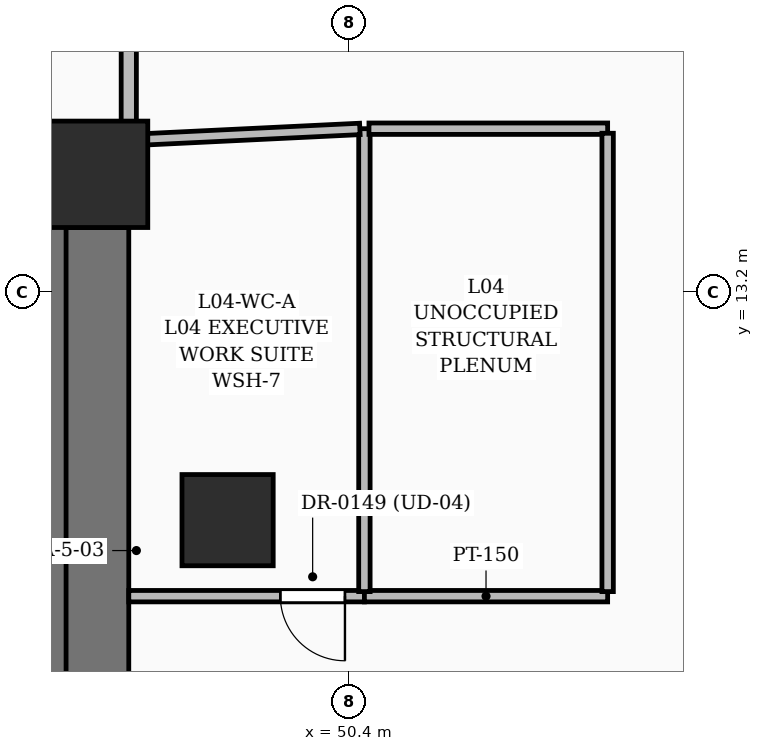
"""IFC4 building model, lengths in metres.
Left out: names, types, materials, properties, quantities, classifications, styles, units other than length and angle.
Written with IfcOpenShell. Run it as: python <this file> out.ifc"""

import sys

from ifc_helpers import new_model, si_unit, direction, frame, frame_2d, origin, origin_2d, place, context, subcontext, project, spatial, rectangle, extrude, element, fill, save


model = new_model("IFC4")
c1 = context("Model", 3, precision=1e-05, world=origin(), true_north=direction((0.0, 1.0)))
c2 = subcontext(c1, "Body", "Model", "MODEL_VIEW")
j1 = project(units=[si_unit("LENGTHUNIT", "METRE"), si_unit("PLANEANGLEUNIT", "RADIAN")], contexts=[c1])
p1 = place(None, origin())
s1 = spatial("IfcSite", under=j1, at=p1, CompositionType="ELEMENT")
p2 = place(p1, origin())
s2 = spatial("IfcBuilding", under=s1, at=p2, CompositionType="ELEMENT")
p3 = place(p2, frame((0.0, 0.0, 21.9)))
s3 = spatial("IfcBuildingStorey", under=s2, at=p3, CompositionType="ELEMENT", Elevation=21.9)
p4 = place(p3, frame((47.05, 14.75, 0.0), z_axis=(0.0, 0.0, 1.0), x_axis=(1.0, 0.0, 0.0)))
e1 = element("IfcColumn", 1, at=p4, inside=s3, PredefinedType="COLUMN", context=c2, shape_type="SweptSolid", body=[
    extrude(rectangle(XDim=1.4, YDim=1.4, at=origin_2d()), origin(), (0.0, 0.0, 1.0), 4.5),
])
p5 = place(p3, frame((48.8, 10.2, 0.0), z_axis=(0.0, 0.0, 1.0), x_axis=(1.0, 0.0, 0.0)))
e2 = element("IfcColumn", 2, at=p5, inside=s3, PredefinedType="COLUMN", context=c2, shape_type="SweptSolid", body=[
    extrude(rectangle(XDim=1.2, YDim=1.2, at=origin_2d()), origin(), (0.0, 0.0, 1.0), 4.5),
])
p6 = place(p3, frame((47.05, 5.25, 0.0), z_axis=(0.0, 0.0, 1.0), x_axis=(0.0, 1.0, 0.0)))
e3 = element("IfcWall", 3, at=p6, inside=s3, PredefinedType="SHEAR", context=c2, shape_type="SweptSolid", body=[
    extrude(rectangle(XDim=8.8, YDim=0.9, at=frame_2d((4.4, 0.0))), origin(), (0.0, 0.0, 1.0), 4.5),
])
p7 = place(p3, frame((46.5, 5.2, 0.0), z_axis=(0.0, 0.0, 1.0), x_axis=(0.0, 1.0, 0.0)))
e4 = element("IfcWall", 4, at=p7, inside=s3, PredefinedType="SOLIDWALL", context=c2, shape_type="SweptSolid", body=[
    extrude(rectangle(XDim=9.1, YDim=0.35, at=frame_2d((4.55, 0.0))), origin(), (0.0, 0.0, 1.0), 4.5),
])
p8 = place(p3, frame((47.5, 15.2, 0.0), z_axis=(0.0, 0.0, 1.0), x_axis=(0.0, 1.0, 0.0)))
e5 = element("IfcWall", 5, at=p8, inside=s3, PredefinedType="PARTITIONING", context=c2, shape_type="SweptSolid", body=[
    extrude(rectangle(XDim=2.6, YDim=0.2, at=frame_2d((1.3, 0.0))), origin(), (0.0, 0.0, 1.0), 1.97),
])
p9 = place(p3, frame((50.6, 9.2, 0.0), z_axis=(0.0, 0.0, 1.0), x_axis=(-1.0, 0.0, 0.0)))
e6 = element("IfcWall", 6, at=p9, inside=s3, PredefinedType="PARTITIONING", context=c2, shape_type="SweptSolid", body=[
    extrude(rectangle(XDim=3.1, YDim=0.15, at=frame_2d((1.55, 0.0))), origin(), (0.0, 0.0, 1.0), 3.159),
])
p10 = place(p9, frame((0.256, 0.0, 0.0)))
e7 = element("IfcOpeningElement", 7, at=p10, cuts=e6, PredefinedType="OPENING", context=c2, shape_type="SweptSolid", body=[
    extrude(rectangle(XDim=0.85, YDim=2.1, at=frame_2d((0.425, 1.05))), frame((0.0, 0.085, 0.0), z_axis=(0.0, -1.0, 0.0), x_axis=(1.0, 0.0, 0.0)), (0.0, 0.0, 1.0), 0.17),
])
p11 = place(p3, frame((53.8, 9.2, 0.0), z_axis=(0.0, 0.0, 1.0), x_axis=(-1.0, 0.0, 0.0)))
e8 = element("IfcWall", 8, at=p11, inside=s3, PredefinedType="PARTITIONING", context=c2, shape_type="SweptSolid", body=[
    extrude(rectangle(XDim=3.2, YDim=0.15, at=frame_2d((1.6, 0.0))), origin(), (0.0, 0.0, 1.0), 3.761),
])
p12 = place(p3, frame((50.6, 9.26, 0.0), z_axis=(0.0, 0.0, 1.0), x_axis=(0.0, 1.0, 0.0)))
e9 = element("IfcWall", 9, at=p12, inside=s3, PredefinedType="PARTITIONING", context=c2, shape_type="SweptSolid", body=[
    extrude(rectangle(XDim=6.09, YDim=0.15, at=frame_2d((3.045, 0.0))), origin(), (0.0, 0.0, 1.0), 1.97),
])
p13 = place(p3, frame((50.54, 15.347, 0.0), z_axis=(0.0, 0.0, 1.0), x_axis=(-0.998830110694, -0.048357108796, 0.0)))
e10 = element("IfcWall", 10, at=p13, inside=s3, PredefinedType="PARTITIONING", context=c2, shape_type="SweptSolid", body=[
    extrude(rectangle(XDim=2.958, YDim=0.15, at=frame_2d((1.479, 0.0))), origin(), (0.0, 0.0, 1.0), 1.97),
])
p14 = place(p3, frame((53.8, 15.35, 0.0), z_axis=(0.0, 0.0, 1.0), x_axis=(-1.0, 0.0, 0.0)))
e11 = element("IfcWall", 11, at=p14, inside=s3, PredefinedType="PARTITIONING", context=c2, shape_type="SweptSolid", body=[
    extrude(rectangle(XDim=3.14, YDim=0.15, at=frame_2d((1.57, 0.0))), origin(), (0.0, 0.0, 1.0), 3.761),
])
p15 = place(p3, frame((53.8, 9.26, 0.0), z_axis=(0.0, 0.0, 1.0), x_axis=(0.0, 1.0, 0.0)))
e12 = element("IfcWall", 12, at=p15, inside=s3, PredefinedType="PARTITIONING", context=c2, shape_type="SweptSolid", body=[
    extrude(rectangle(XDim=6.03, YDim=0.15, at=frame_2d((3.015, 0.0))), origin(), (0.0, 0.0, 1.0), 1.97),
])
p16 = place(p10, origin())
e13 = element("IfcDoor", 13, at=p16, inside=s3, OperationType="SINGLE_SWING_LEFT", PredefinedType="DOOR", context=c2, shape_type="SweptSolid", body=[
    extrude(rectangle(XDim=0.85, YDim=2.1, at=frame_2d((0.425, 1.05))), frame((0.0, 0.025, 0.0), z_axis=(0.0, -1.0, 0.0), x_axis=(1.0, 0.0, 0.0)), (0.0, 0.0, 1.0), 0.05),
])
fill(e7, e13)
save(model, sys.argv[1])
